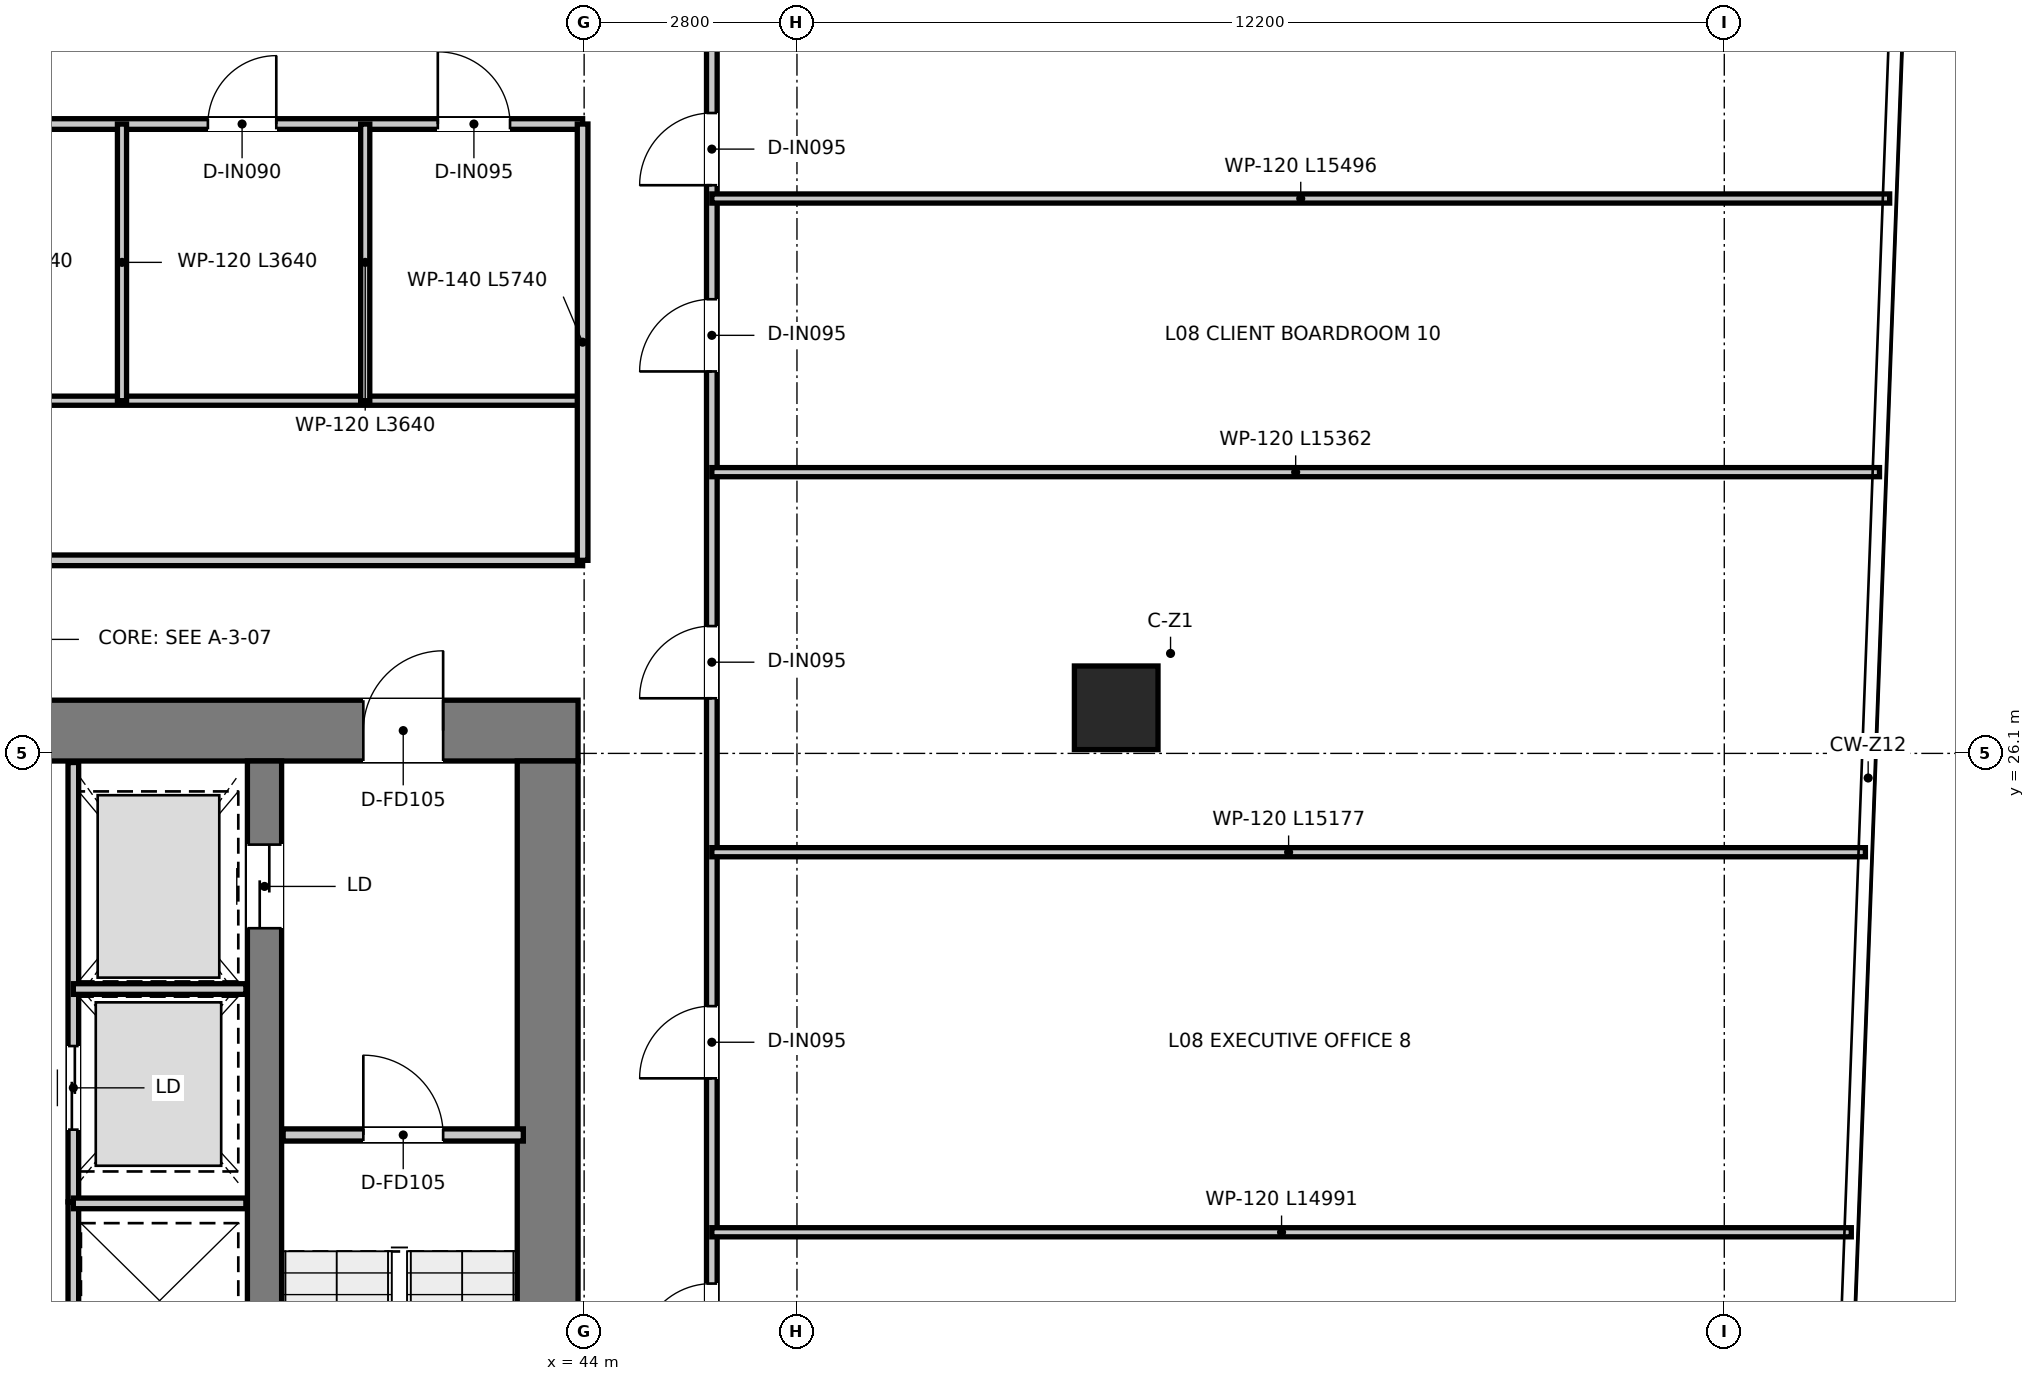
"""IFC4 building model, lengths in metres.
Left out: names, types, materials, properties, quantities, classifications, styles, units other than length and angle.
Written with IfcOpenShell. Run it as: python <this file> out.ifc"""

import sys

from ifc_helpers import new_model, si_unit, direction, frame, frame_2d, origin, origin_2d, place, context, subcontext, project, spatial, rectangle, extrude, source, transform, mapped, element, fill, save


model = new_model("IFC4")
c1 = context("Model", 3, precision=1e-05, world=origin(), true_north=direction((0.0, 1.0)))
c2 = subcontext(c1, "Body", "Model", "MODEL_VIEW")
j1 = project(units=[si_unit("LENGTHUNIT", "METRE"), si_unit("PLANEANGLEUNIT", "RADIAN")], contexts=[c1])
p1 = place(None, origin())
s1 = spatial("IfcSite", under=j1, at=p1, CompositionType="ELEMENT")
p2 = place(p1, origin())
s2 = spatial("IfcBuilding", under=s1, at=p2, CompositionType="ELEMENT")
p3 = place(p2, frame((0.0, 0.0, 36.85)))
s3 = spatial("IfcBuildingStorey", under=s2, at=p3, CompositionType="ELEMENT", Elevation=36.85)
p4 = place(p3, frame((28.08, 26.4, 0.0), z_axis=(0.0, 0.0, 1.0), x_axis=(1.0, 0.0, 0.0)))
e1 = element("IfcWall", 1, at=p4, inside=s3, PredefinedType="SHEAR", context=c2, shape_type="SweptSolid", body=[
    extrude(rectangle(XDim=15.84, YDim=0.8, at=frame_2d((7.92, 0.0))), origin(), (0.0, 0.0, 1.0), 3.95),
])
p5 = place(p4, frame((7.22, 0.0, 0.0)))
e2 = element("IfcOpeningElement", 2, at=p5, cuts=e1, PredefinedType="OPENING", context=c2, shape_type="SweptSolid", body=[
    extrude(rectangle(XDim=1.4, YDim=2.2, at=frame_2d((0.7, 1.1))), frame((0.0, 0.41, 0.0), z_axis=(0.0, -1.0, 0.0), x_axis=(1.0, 0.0, 0.0)), (0.0, 0.0, 1.0), 0.82),
])
p6 = place(p4, frame((1.775, 0.0, 0.0)))
e3 = element("IfcOpeningElement", 3, at=p6, cuts=e1, PredefinedType="OPENING", context=c2, shape_type="SweptSolid", body=[
    extrude(rectangle(XDim=1.05, YDim=2.1, at=frame_2d((0.525, 1.05))), frame((0.0, 0.41, 0.0), z_axis=(0.0, -1.0, 0.0), x_axis=(1.0, 0.0, 0.0)), (0.0, 0.0, 1.0), 0.82),
])
p7 = place(p4, frame((13.015, 0.0, 0.0)))
e4 = element("IfcOpeningElement", 4, at=p7, cuts=e1, PredefinedType="OPENING", context=c2, shape_type="SweptSolid", body=[
    extrude(rectangle(XDim=1.05, YDim=2.1, at=frame_2d((0.525, 1.05))), frame((0.0, 0.41, 0.0), z_axis=(0.0, -1.0, 0.0), x_axis=(1.0, 0.0, 0.0)), (0.0, 0.0, 1.0), 0.82),
])
p8 = place(p3, frame((43.52, 11.3, 0.0), z_axis=(0.0, 0.0, 1.0), x_axis=(0.0, 1.0, 0.0)))
e5 = element("IfcWall", 5, at=p8, inside=s3, PredefinedType="SHEAR", context=c2, shape_type="SweptSolid", body=[
    extrude(rectangle(XDim=14.7, YDim=0.8, at=frame_2d((7.35, 0.0))), origin(), (0.0, 0.0, 1.0), 3.95),
])
p9 = place(p3, frame((39.795, 13.22, 0.0), z_axis=(0.0, 0.0, 1.0), x_axis=(0.0, 1.0, 0.0)))
e6 = element("IfcWall", 6, at=p9, inside=s3, PredefinedType="SHEAR", context=c2, shape_type="SweptSolid", body=[
    extrude(rectangle(XDim=12.78, YDim=0.45, at=frame_2d((6.39, 0.0))), origin(), (0.0, 0.0, 1.0), 3.95),
])
p10 = place(p9, frame((10.58, 0.0, 0.0)))
e7 = element("IfcOpeningElement", 7, at=p10, cuts=e6, PredefinedType="OPENING", context=c2, shape_type="SweptSolid", body=[
    extrude(rectangle(XDim=1.1, YDim=2.15, at=frame_2d((0.55, 1.075))), frame((0.0, 0.235, 0.0), z_axis=(0.0, -1.0, 0.0), x_axis=(1.0, 0.0, 0.0)), (0.0, 0.0, 1.0), 0.47),
])
m1 = source(origin(), c2, "Body", "SweptSolid", [
    extrude(rectangle(XDim=1.1, YDim=1.1, at=origin_2d()), origin(), (0.0, 0.0, 1.0), 3.95),
])
p11 = place(p3, frame((51.0, 26.7, 0.0), z_axis=(0.0, 0.0, 1.0), x_axis=(1.0, 0.0, 0.0)))
e8 = element("IfcColumn", 8, at=p11, inside=s3, PredefinedType="COLUMN", context=c2, shape_type="MappedRepresentation", body=[
    mapped(m1, transform((0.0, 0.0, 0.0), x_axis=(1.0, 0.0, 0.0), y_axis=(0.0, 1.0, 0.0), z_axis=(0.0, 0.0, 1.0), scale=1.0)),
])
p12 = place(p3, frame((40.04, 21.08, 0.0), z_axis=(0.0, 0.0, 1.0), x_axis=(1.0, 0.0, 0.0)))
e9 = element("IfcWall", 9, at=p12, inside=s3, PredefinedType="PARTITIONING", context=c2, shape_type="SweptSolid", body=[
    extrude(rectangle(XDim=3.16, YDim=0.16, at=frame_2d((1.58, 0.0))), origin(), (0.0, 0.0, 1.0), 3.67),
])
p13 = place(p12, frame((1.055, 0.0, 0.0)))
e10 = element("IfcOpeningElement", 10, at=p13, cuts=e9, PredefinedType="OPENING", context=c2, shape_type="SweptSolid", body=[
    extrude(rectangle(XDim=1.05, YDim=2.1, at=frame_2d((0.525, 1.05))), frame((0.0, 0.09, 0.0), z_axis=(0.0, -1.0, 0.0), x_axis=(1.0, 0.0, 0.0)), (0.0, 0.0, 1.0), 0.18),
])
p14 = place(p3, frame((37.28, 20.2, 0.0), z_axis=(0.0, 0.0, 1.0), x_axis=(0.0, 1.0, 0.0)))
e11 = element("IfcWall", 11, at=p14, inside=s3, PredefinedType="PARTITIONING", context=c2, shape_type="SweptSolid", body=[
    extrude(rectangle(XDim=5.78, YDim=0.14, at=frame_2d((2.89, 0.0))), origin(), (0.0, 0.0, 1.0), 2.47),
])
p15 = place(p14, frame((0.95, 0.0, 0.0)))
e12 = element("IfcOpeningElement", 12, at=p15, cuts=e11, PredefinedType="OPENING", context=c2, shape_type="SweptSolid", body=[
    extrude(rectangle(XDim=1.1, YDim=2.15, at=frame_2d((0.55, 1.075))), frame((0.0, 0.08, 0.0), z_axis=(0.0, -1.0, 0.0), x_axis=(1.0, 0.0, 0.0)), (0.0, 0.0, 1.0), 0.16),
])
p16 = place(p3, frame((37.28, 23.0, 0.0), z_axis=(0.0, 0.0, 1.0), x_axis=(1.0, 0.0, 0.0)))
e13 = element("IfcWall", 13, at=p16, inside=s3, PredefinedType="PARTITIONING", context=c2, shape_type="SweptSolid", body=[
    extrude(rectangle(XDim=2.27, YDim=0.14, at=frame_2d((1.135, 0.0))), origin(), (0.0, 0.0, 1.0), 2.47),
])
p17 = place(p3, frame((37.28, 17.78, 0.0), z_axis=(0.0, 0.0, 1.0), x_axis=(0.0, 1.0, 0.0)))
e14 = element("IfcWall", 14, at=p17, inside=s3, PredefinedType="PARTITIONING", context=c2, shape_type="SweptSolid", body=[
    extrude(rectangle(XDim=2.42, YDim=0.14, at=frame_2d((1.21, 0.0))), origin(), (0.0, 0.0, 1.0), 3.67),
])
p18 = place(p3, frame((37.28, 20.18, 0.0), z_axis=(0.0, 0.0, 1.0), x_axis=(1.0, 0.0, 0.0)))
e15 = element("IfcWall", 15, at=p18, inside=s3, PredefinedType="PARTITIONING", context=c2, shape_type="SweptSolid", body=[
    extrude(rectangle(XDim=2.27, YDim=0.14, at=frame_2d((1.135, 0.0))), origin(), (0.0, 0.0, 1.0), 3.67),
])
p19 = place(p3, frame((28.02, 28.64, 0.0), z_axis=(0.0, 0.0, 1.0), x_axis=(1.0, 0.0, 0.0)))
e16 = element("IfcWall", 16, at=p19, inside=s3, PredefinedType="PARTITIONING", context=c2, shape_type="SweptSolid", body=[
    extrude(rectangle(XDim=15.96, YDim=0.14, at=frame_2d((7.98, 0.0))), origin(), (0.0, 0.0, 1.0), 3.08),
])
p20 = place(p19, frame((7.455, 0.0, 0.0)))
e17 = element("IfcOpeningElement", 17, at=p20, cuts=e16, PredefinedType="OPENING", context=c2, shape_type="SweptSolid", body=[
    extrude(rectangle(XDim=1.05, YDim=2.15, at=frame_2d((0.525, 1.075))), frame((0.0, 0.08, 0.0), z_axis=(0.0, -1.0, 0.0), x_axis=(1.0, 0.0, 0.0)), (0.0, 0.0, 1.0), 0.16),
])
p21 = place(p3, frame((28.02, 30.74, 0.0), z_axis=(0.0, 0.0, 1.0), x_axis=(1.0, 0.0, 0.0)))
e18 = element("IfcWall", 18, at=p21, inside=s3, PredefinedType="PARTITIONING", context=c2, shape_type="SweptSolid", body=[
    extrude(rectangle(XDim=15.96, YDim=0.12, at=frame_2d((7.98, 0.0))), origin(), (0.0, 0.0, 1.0), 3.08),
])
p22 = place(p3, frame((28.02, 34.38, 0.0), z_axis=(0.0, 0.0, 1.0), x_axis=(1.0, 0.0, 0.0)))
e19 = element("IfcWall", 19, at=p22, inside=s3, PredefinedType="PARTITIONING", context=c2, shape_type="SweptSolid", body=[
    extrude(rectangle(XDim=15.96, YDim=0.14, at=frame_2d((7.98, 0.0))), origin(), (0.0, 0.0, 1.0), 3.08),
])
p23 = place(p22, frame((7.83, 0.0, 0.0)))
e20 = element("IfcOpeningElement", 20, at=p23, cuts=e19, PredefinedType="OPENING", context=c2, shape_type="SweptSolid", body=[
    extrude(rectangle(XDim=0.9, YDim=2.1, at=frame_2d((0.45, 1.05))), frame((0.0, 0.08, 0.0), z_axis=(0.0, -1.0, 0.0), x_axis=(1.0, 0.0, 0.0)), (0.0, 0.0, 1.0), 0.16),
])
p24 = place(p22, frame((11.03, 0.0, 0.0)))
e21 = element("IfcOpeningElement", 21, at=p24, cuts=e19, PredefinedType="OPENING", context=c2, shape_type="SweptSolid", body=[
    extrude(rectangle(XDim=0.9, YDim=2.1, at=frame_2d((0.45, 1.05))), frame((0.0, 0.08, 0.0), z_axis=(0.0, -1.0, 0.0), x_axis=(1.0, 0.0, 0.0)), (0.0, 0.0, 1.0), 0.16),
])
p25 = place(p22, frame((14.055, 0.0, 0.0)))
e22 = element("IfcOpeningElement", 22, at=p25, cuts=e19, PredefinedType="OPENING", context=c2, shape_type="SweptSolid", body=[
    extrude(rectangle(XDim=0.95, YDim=2.1, at=frame_2d((0.475, 1.05))), frame((0.0, 0.08, 0.0), z_axis=(0.0, -1.0, 0.0), x_axis=(1.0, 0.0, 0.0)), (0.0, 0.0, 1.0), 0.16),
])
p26 = place(p22, frame((2.855, 0.0, 0.0)))
e23 = element("IfcOpeningElement", 23, at=p26, cuts=e19, PredefinedType="OPENING", context=c2, shape_type="SweptSolid", body=[
    extrude(rectangle(XDim=0.95, YDim=2.1, at=frame_2d((0.475, 1.05))), frame((0.0, 0.08, 0.0), z_axis=(0.0, -1.0, 0.0), x_axis=(1.0, 0.0, 0.0)), (0.0, 0.0, 1.0), 0.16),
])
p27 = place(p3, frame((43.98, 28.64, 0.0), z_axis=(0.0, 0.0, 1.0), x_axis=(0.0, 1.0, 0.0)))
e24 = element("IfcWall", 24, at=p27, inside=s3, PredefinedType="PARTITIONING", context=c2, shape_type="SweptSolid", body=[
    extrude(rectangle(XDim=5.74, YDim=0.14, at=frame_2d((2.87, 0.0))), origin(), (0.0, 0.0, 1.0), 3.22),
])
for number, where, z_axis, x_axis in (
    (25, (37.92, 30.74, 0.0), (0.0, 0.0, 1.0), (0.0, 1.0, 0.0)),
    (26, (41.12, 30.74, 0.0), (0.0, 0.0, 1.0), (0.0, 1.0, 0.0)),
):
    element("IfcWall", number, at=place(p3, frame(where, z_axis=z_axis, x_axis=x_axis)), inside=s3, PredefinedType="PARTITIONING", context=c2, shape_type="SweptSolid", body=[
        extrude(rectangle(XDim=3.64, YDim=0.12, at=frame_2d((1.82, 0.0))), origin(), (0.0, 0.0, 1.0), 3.12),
    ])
p28 = place(p3, frame((45.68, 10.5, 0.0), z_axis=(0.0, 0.0, 1.0), x_axis=(0.0, 1.0, 0.0)))
e27 = element("IfcWall", 27, at=p28, inside=s3, PredefinedType="PARTITIONING", context=c2, shape_type="SweptSolid", body=[
    extrude(rectangle(XDim=25.62, YDim=0.14, at=frame_2d((12.81, 0.0))), origin(), (0.0, 0.0, 1.0), 2.97),
])
p29 = place(p28, frame((7.675, 0.0, 0.0)))
e28 = element("IfcOpeningElement", 28, at=p29, cuts=e27, PredefinedType="OPENING", context=c2, shape_type="SweptSolid", body=[
    extrude(rectangle(XDim=0.95, YDim=2.1, at=frame_2d((0.475, 1.05))), frame((0.0, 0.08, 0.0), z_axis=(0.0, -1.0, 0.0), x_axis=(1.0, 0.0, 0.0)), (0.0, 0.0, 1.0), 0.16),
])
p30 = place(p28, frame((11.325, 0.0, 0.0)))
e29 = element("IfcOpeningElement", 29, at=p30, cuts=e27, PredefinedType="OPENING", context=c2, shape_type="SweptSolid", body=[
    extrude(rectangle(XDim=0.95, YDim=2.1, at=frame_2d((0.475, 1.05))), frame((0.0, 0.08, 0.0), z_axis=(0.0, -1.0, 0.0), x_axis=(1.0, 0.0, 0.0)), (0.0, 0.0, 1.0), 0.16),
])
p31 = place(p28, frame((16.325, 0.0, 0.0)))
e30 = element("IfcOpeningElement", 30, at=p31, cuts=e27, PredefinedType="OPENING", context=c2, shape_type="SweptSolid", body=[
    extrude(rectangle(XDim=0.95, YDim=2.1, at=frame_2d((0.475, 1.05))), frame((0.0, 0.08, 0.0), z_axis=(0.0, -1.0, 0.0), x_axis=(1.0, 0.0, 0.0)), (0.0, 0.0, 1.0), 0.16),
])
p32 = place(p28, frame((20.625, 0.0, 0.0)))
e31 = element("IfcOpeningElement", 31, at=p32, cuts=e27, PredefinedType="OPENING", context=c2, shape_type="SweptSolid", body=[
    extrude(rectangle(XDim=0.95, YDim=2.1, at=frame_2d((0.475, 1.05))), frame((0.0, 0.08, 0.0), z_axis=(0.0, -1.0, 0.0), x_axis=(1.0, 0.0, 0.0)), (0.0, 0.0, 1.0), 0.16),
])
p33 = place(p28, frame((23.075, 0.0, 0.0)))
e32 = element("IfcOpeningElement", 32, at=p33, cuts=e27, PredefinedType="OPENING", context=c2, shape_type="SweptSolid", body=[
    extrude(rectangle(XDim=0.95, YDim=2.1, at=frame_2d((0.475, 1.05))), frame((0.0, 0.08, 0.0), z_axis=(0.0, -1.0, 0.0), x_axis=(1.0, 0.0, 0.0)), (0.0, 0.0, 1.0), 0.16),
])
p34 = place(p3, frame((45.68, 19.8, 0.0), z_axis=(0.0, 0.0, 1.0), x_axis=(1.0, 0.0, 0.0)))
e33 = element("IfcWall", 33, at=p34, inside=s3, PredefinedType="PARTITIONING", context=c2, shape_type="SweptSolid", body=[
    extrude(rectangle(XDim=14.991, YDim=0.12, at=frame_2d((7.496, 0.0))), origin(), (0.0, 0.0, 1.0), 2.97),
])
p35 = place(p3, frame((45.68, 24.8, 0.0), z_axis=(0.0, 0.0, 1.0), x_axis=(1.0, 0.0, 0.0)))
e34 = element("IfcWall", 34, at=p35, inside=s3, PredefinedType="PARTITIONING", context=c2, shape_type="SweptSolid", body=[
    extrude(rectangle(XDim=15.177, YDim=0.12, at=frame_2d((7.588, 0.0))), origin(), (0.0, 0.0, 1.0), 2.97),
])
p36 = place(p3, frame((45.68, 29.8, 0.0), z_axis=(0.0, 0.0, 1.0), x_axis=(1.0, 0.0, 0.0)))
e35 = element("IfcWall", 35, at=p36, inside=s3, PredefinedType="PARTITIONING", context=c2, shape_type="SweptSolid", body=[
    extrude(rectangle(XDim=15.362, YDim=0.12, at=frame_2d((7.681, 0.0))), origin(), (0.0, 0.0, 1.0), 2.97),
])
p37 = place(p3, frame((45.68, 33.4, 0.0), z_axis=(0.0, 0.0, 1.0), x_axis=(1.0, 0.0, 0.0)))
e36 = element("IfcWall", 36, at=p37, inside=s3, PredefinedType="PARTITIONING", context=c2, shape_type="SweptSolid", body=[
    extrude(rectangle(XDim=15.496, YDim=0.12, at=frame_2d((7.748, 0.0))), origin(), (0.0, 0.0, 1.0), 2.97),
])
p38 = place(p13, origin())
e37 = element("IfcDoor", 37, at=p38, inside=s3, OperationType="SINGLE_SWING_LEFT", PredefinedType="DOOR", context=c2, shape_type="SweptSolid", body=[
    extrude(rectangle(XDim=1.05, YDim=2.1, at=frame_2d((0.525, 1.05))), frame((0.0, 0.025, 0.0), z_axis=(0.0, -1.0, 0.0), x_axis=(1.0, 0.0, 0.0)), (0.0, 0.0, 1.0), 0.05),
])
fill(e10, e37)
p39 = place(p7, origin())
e38 = element("IfcDoor", 38, at=p39, inside=s3, OperationType="SINGLE_SWING_RIGHT", PredefinedType="DOOR", context=c2, shape_type="SweptSolid", body=[
    extrude(rectangle(XDim=1.05, YDim=2.1, at=frame_2d((0.525, 1.05))), frame((0.0, 0.025, 0.0), z_axis=(0.0, -1.0, 0.0), x_axis=(1.0, 0.0, 0.0)), (0.0, 0.0, 1.0), 0.05),
])
fill(e4, e38)
p40 = place(p10, origin())
e39 = element("IfcDoor", 39, at=p40, inside=s3, OperationType="DOUBLE_DOOR_SLIDING", PredefinedType="DOOR", context=c2, shape_type="SweptSolid", body=[
    extrude(rectangle(XDim=1.1, YDim=2.15, at=frame_2d((0.55, 1.075))), frame((0.0, 0.025, 0.0), z_axis=(0.0, -1.0, 0.0), x_axis=(1.0, 0.0, 0.0)), (0.0, 0.0, 1.0), 0.05),
])
fill(e7, e39)
p41 = place(p15, origin())
e40 = element("IfcDoor", 40, at=p41, inside=s3, OperationType="DOUBLE_DOOR_SLIDING", PredefinedType="DOOR", context=c2, shape_type="SweptSolid", body=[
    extrude(rectangle(XDim=1.1, YDim=2.15, at=frame_2d((0.55, 1.075))), frame((0.0, 0.025, 0.0), z_axis=(0.0, -1.0, 0.0), x_axis=(1.0, 0.0, 0.0)), (0.0, 0.0, 1.0), 0.05),
])
fill(e12, e40)
p42 = place(p24, origin())
e41 = element("IfcDoor", 41, at=p42, inside=s3, OperationType="SINGLE_SWING_RIGHT", PredefinedType="DOOR", context=c2, shape_type="SweptSolid", body=[
    extrude(rectangle(XDim=0.9, YDim=2.1, at=frame_2d((0.45, 1.05))), frame((0.0, 0.025, 0.0), z_axis=(0.0, -1.0, 0.0), x_axis=(1.0, 0.0, 0.0)), (0.0, 0.0, 1.0), 0.05),
])
fill(e21, e41)
p43 = place(p25, origin())
e42 = element("IfcDoor", 42, at=p43, inside=s3, OperationType="SINGLE_SWING_LEFT", PredefinedType="DOOR", context=c2, shape_type="SweptSolid", body=[
    extrude(rectangle(XDim=0.95, YDim=2.1, at=frame_2d((0.475, 1.05))), frame((0.0, 0.025, 0.0), z_axis=(0.0, -1.0, 0.0), x_axis=(1.0, 0.0, 0.0)), (0.0, 0.0, 1.0), 0.05),
])
fill(e22, e42)
p44 = place(p29, origin())
e43 = element("IfcDoor", 43, at=p44, inside=s3, OperationType="SINGLE_SWING_LEFT", PredefinedType="DOOR", context=c2, shape_type="SweptSolid", body=[
    extrude(rectangle(XDim=0.95, YDim=2.1, at=frame_2d((0.475, 1.05))), frame((0.0, 0.025, 0.0), z_axis=(0.0, -1.0, 0.0), x_axis=(1.0, 0.0, 0.0)), (0.0, 0.0, 1.0), 0.05),
])
fill(e28, e43)
p45 = place(p30, origin())
e44 = element("IfcDoor", 44, at=p45, inside=s3, OperationType="SINGLE_SWING_LEFT", PredefinedType="DOOR", context=c2, shape_type="SweptSolid", body=[
    extrude(rectangle(XDim=0.95, YDim=2.1, at=frame_2d((0.475, 1.05))), frame((0.0, 0.025, 0.0), z_axis=(0.0, -1.0, 0.0), x_axis=(1.0, 0.0, 0.0)), (0.0, 0.0, 1.0), 0.05),
])
fill(e29, e44)
p46 = place(p31, origin())
e45 = element("IfcDoor", 45, at=p46, inside=s3, OperationType="SINGLE_SWING_LEFT", PredefinedType="DOOR", context=c2, shape_type="SweptSolid", body=[
    extrude(rectangle(XDim=0.95, YDim=2.1, at=frame_2d((0.475, 1.05))), frame((0.0, 0.025, 0.0), z_axis=(0.0, -1.0, 0.0), x_axis=(1.0, 0.0, 0.0)), (0.0, 0.0, 1.0), 0.05),
])
fill(e30, e45)
p47 = place(p32, origin())
e46 = element("IfcDoor", 46, at=p47, inside=s3, OperationType="SINGLE_SWING_LEFT", PredefinedType="DOOR", context=c2, shape_type="SweptSolid", body=[
    extrude(rectangle(XDim=0.95, YDim=2.1, at=frame_2d((0.475, 1.05))), frame((0.0, 0.025, 0.0), z_axis=(0.0, -1.0, 0.0), x_axis=(1.0, 0.0, 0.0)), (0.0, 0.0, 1.0), 0.05),
])
fill(e31, e46)
p48 = place(p33, origin())
e47 = element("IfcDoor", 47, at=p48, inside=s3, OperationType="SINGLE_SWING_LEFT", PredefinedType="DOOR", context=c2, shape_type="SweptSolid", body=[
    extrude(rectangle(XDim=0.95, YDim=2.1, at=frame_2d((0.475, 1.05))), frame((0.0, 0.025, 0.0), z_axis=(0.0, -1.0, 0.0), x_axis=(1.0, 0.0, 0.0)), (0.0, 0.0, 1.0), 0.05),
])
fill(e32, e47)
save(model, sys.argv[1])
